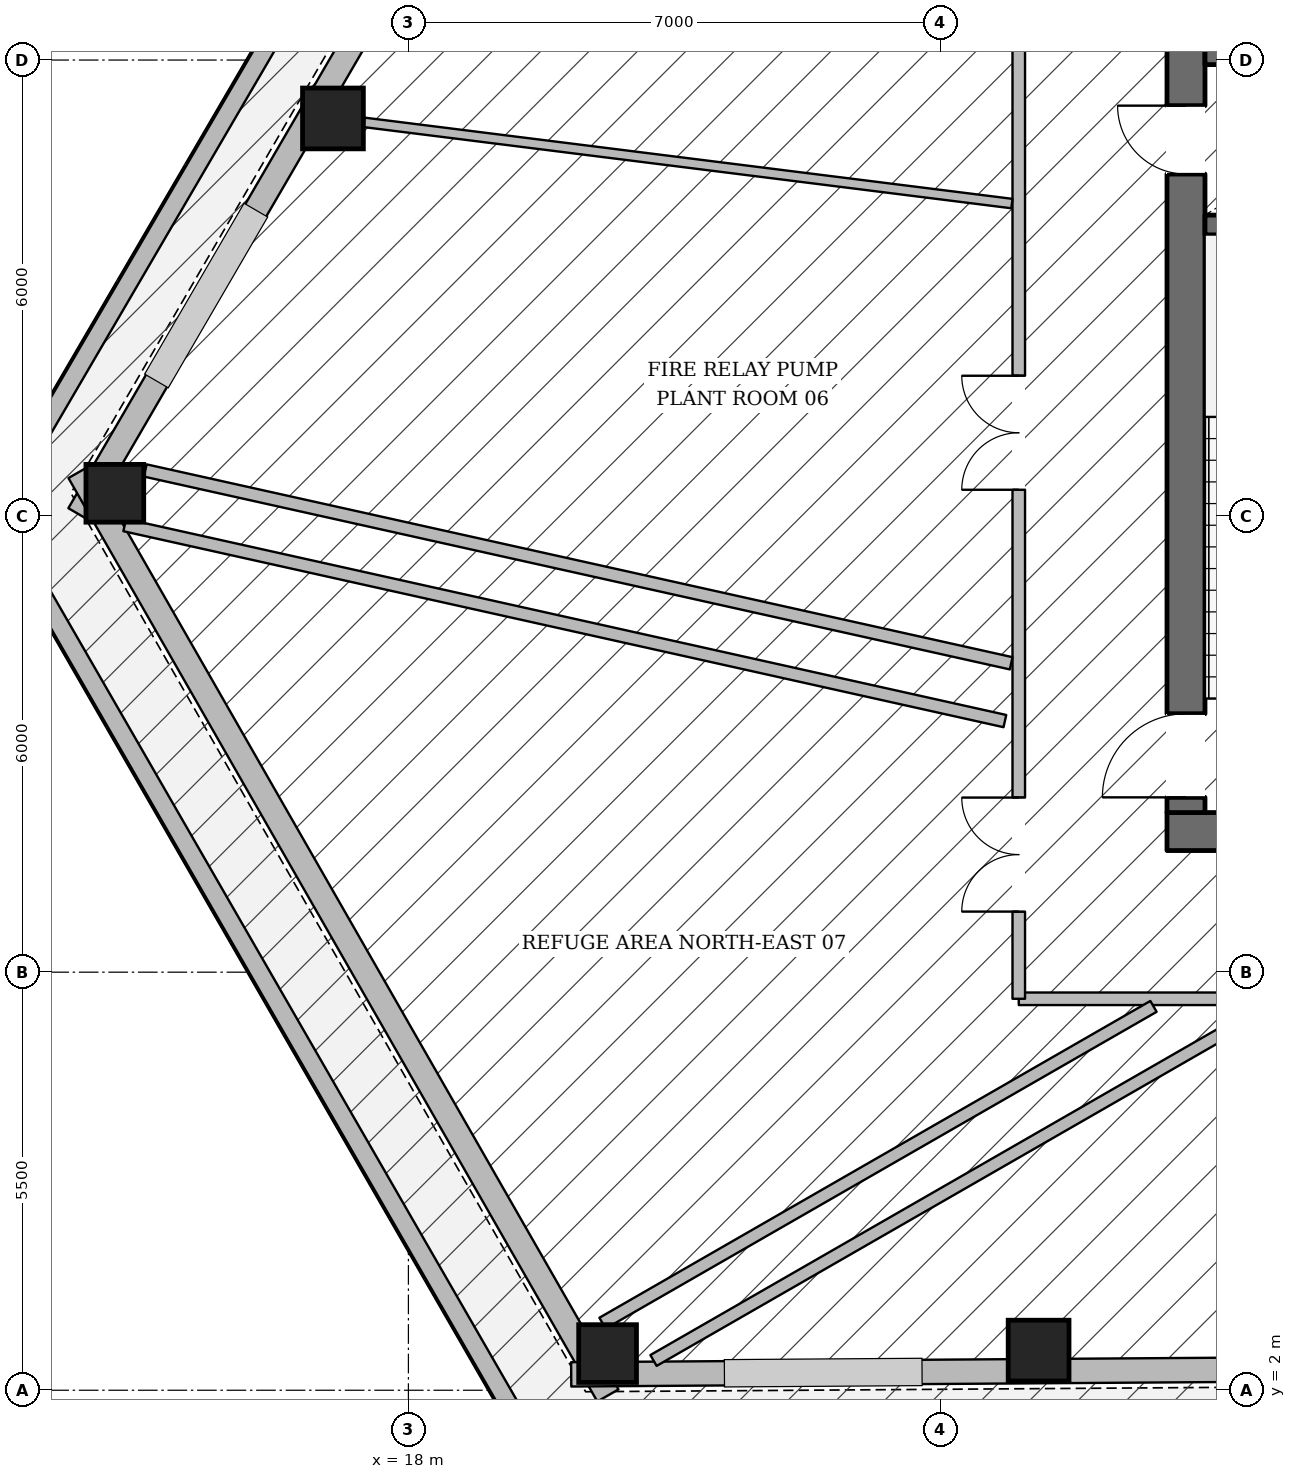
"""IFC4 building model, lengths in metres.
Left out: names, types, materials, properties, quantities, classifications, styles, units other than length and angle.
Written with IfcOpenShell. Run it as: python <this file> out.ifc"""

import sys

from ifc_helpers import new_model, si_unit, direction, frame, frame_2d, origin, origin_2d, place, context, subcontext, project, spatial, rectangle, hollow_rectangle, extrude, element, fill, save


model = new_model("IFC4")
c1 = context("Model", 3, precision=1e-05, world=origin(), true_north=direction((0.0, 1.0)))
c2 = subcontext(c1, "Body", "Model", "MODEL_VIEW")
j1 = project(units=[si_unit("LENGTHUNIT", "METRE"), si_unit("PLANEANGLEUNIT", "RADIAN")], contexts=[c1])
p1 = place(None, origin())
s1 = spatial("IfcSite", under=j1, at=p1, CompositionType="ELEMENT")
p2 = place(p1, origin())
s2 = spatial("IfcBuilding", under=s1, at=p2, CompositionType="ELEMENT")
p3 = place(p2, frame((0.0, 0.0, 75.3)))
s3 = spatial("IfcBuildingStorey", under=s2, at=p3, CompositionType="ELEMENT", Elevation=75.3)
p4 = place(p3, frame((27.98, 9.35, 0.0), z_axis=(0.0, 0.0, 1.0), x_axis=(1.0, 0.0, 0.0)))
e1 = element("IfcWall", 1, at=p4, inside=s3, PredefinedType="SOLIDWALL", context=c2, shape_type="SweptSolid", body=[
    extrude(rectangle(XDim=20.04, YDim=0.5, at=frame_2d((10.02, 0.0))), origin(), (0.0, 0.0, 1.0), 4.985),
])
p5 = place(p4, frame((10.52, 0.0, 0.0)))
e2 = element("IfcOpeningElement", 2, at=p5, cuts=e1, PredefinedType="OPENING", context=c2, shape_type="SweptSolid", body=[
    extrude(rectangle(XDim=1.4, YDim=2.2, at=frame_2d((0.7, 1.1))), frame((0.0, 0.26, 0.0), z_axis=(0.0, -1.0, 0.0), x_axis=(1.0, 0.0, 0.0)), (0.0, 0.0, 1.0), 0.52),
])
p6 = place(p3, frame((28.23, 9.6, 0.0), z_axis=(0.0, 0.0, 1.0), x_axis=(0.0, 1.0, 0.0)))
e3 = element("IfcWall", 3, at=p6, inside=s3, PredefinedType="SOLIDWALL", context=c2, shape_type="SweptSolid", body=[
    extrude(rectangle(XDim=13.0, YDim=0.5, at=frame_2d((6.5, 0.0))), origin(), (0.0, 0.0, 1.0), 4.985),
])
p7 = place(p6, frame((0.2, 0.0, 0.0)))
e4 = element("IfcOpeningElement", 4, at=p7, cuts=e3, PredefinedType="OPENING", context=c2, shape_type="SweptSolid", body=[
    extrude(rectangle(XDim=1.1, YDim=2.15, at=frame_2d((0.55, 1.075))), frame((0.0, 0.26, 0.0), z_axis=(0.0, -1.0, 0.0), x_axis=(1.0, 0.0, 0.0)), (0.0, 0.0, 1.0), 0.52),
])
p8 = place(p6, frame((8.4, 0.0, 0.0)))
e5 = element("IfcOpeningElement", 5, at=p8, cuts=e3, PredefinedType="OPENING", context=c2, shape_type="SweptSolid", body=[
    extrude(rectangle(XDim=0.9, YDim=2.1, at=frame_2d((0.45, 1.05))), frame((0.0, 0.26, 0.0), z_axis=(0.0, -1.0, 0.0), x_axis=(1.0, 0.0, 0.0)), (0.0, 0.0, 1.0), 0.52),
])
for number, where, z_axis, x_axis in (
    (6, (28.48, 17.33, 0.0), (0.0, 0.0, 1.0), (1.0, 0.0, 0.0)),
    (7, (28.48, 19.57, 0.0), (0.0, 0.0, 1.0), (1.0, 0.0, 0.0)),
):
    element("IfcWall", number, at=place(p3, frame(where, z_axis=z_axis, x_axis=x_axis)), inside=s3, PredefinedType="SHEAR", context=c2, shape_type="SweptSolid", body=[
        extrude(rectangle(XDim=3.2, YDim=0.26, at=frame_2d((1.6, 0.0))), origin(), (0.0, 0.0, 1.0), 4.985),
    ])
p9 = place(p3, frame((17.007, 18.732, 0.0), z_axis=(0.0, 0.0, 1.0), x_axis=(1.0, 0.0, 0.0)))
e8 = element("IfcColumn", 8, at=p9, inside=s3, PredefinedType="COLUMN", context=c2, shape_type="SweptSolid", body=[
    extrude(hollow_rectangle(XDim=0.8, YDim=0.8, WallThickness=0.036, at=origin_2d()), origin(), (0.0, 0.0, 1.0), 4.985),
])
for number, where, z_axis, x_axis in (
    (9, (14.138, 13.8, 0.0), (0.0, 0.0, 1.0), (1.0, 0.0, 0.0)),
    (10, (20.62, 2.482, 0.0), (0.0, 0.0, 1.0), (1.0, 0.0, 0.0)),
):
    element("IfcColumn", number, at=place(p3, frame(where, z_axis=z_axis, x_axis=x_axis)), inside=s3, PredefinedType="COLUMN", context=c2, shape_type="SweptSolid", body=[
        extrude(hollow_rectangle(XDim=0.76, YDim=0.76, WallThickness=0.035, at=origin_2d()), origin(), (0.0, 0.0, 1.0), 4.985),
    ])
p10 = place(p3, frame((26.291, 2.521, 0.0), z_axis=(0.0, 0.0, 1.0), x_axis=(1.0, 0.0, 0.0)))
e11 = element("IfcColumn", 11, at=p10, inside=s3, PredefinedType="COLUMN", context=c2, shape_type="SweptSolid", body=[
    extrude(hollow_rectangle(XDim=0.8, YDim=0.8, WallThickness=0.036, at=origin_2d()), origin(), (0.0, 0.0, 1.0), 4.985),
])
p11 = place(p3, frame((13.665, 13.524, 0.0), z_axis=(0.0, 0.0, 1.0), x_axis=(0.50295003743, 0.864315486295, 0.0)))
e12 = element("IfcWall", 12, at=p11, inside=s3, PredefinedType="STANDARD", context=c2, shape_type="SweptSolid", body=[
    extrude(rectangle(XDim=35.184, YDim=0.32, at=frame_2d((17.592, 0.0))), origin(), (0.0, 0.0, 1.0), 3.677),
])
p12 = place(p3, frame((20.625, 1.931, 0.0), z_axis=(0.0, 0.0, 1.0), x_axis=(-0.497008188636, 0.867745850136, 0.0)))
e13 = element("IfcWall", 13, at=p12, inside=s3, PredefinedType="STANDARD", context=c2, shape_type="SweptSolid", body=[
    extrude(rectangle(XDim=14.0, YDim=0.32, at=frame_2d((7.0, 0.0))), origin(), (0.0, 0.0, 1.0), 3.677),
])
p13 = place(p3, frame((55.119, 2.449, 0.0), z_axis=(0.0, 0.0, 1.0), x_axis=(-0.999976414427, -0.00686808493, 0.0)))
e14 = element("IfcWall", 14, at=p13, inside=s3, PredefinedType="STANDARD", context=c2, shape_type="SweptSolid", body=[
    extrude(rectangle(XDim=34.978, YDim=0.32, at=frame_2d((17.489, 0.0))), origin(), (0.0, 0.0, 1.0), 3.677),
])
p14 = place(p3, frame((30.821, 44.822, 0.0), z_axis=(0.0, 0.0, 1.0), x_axis=(-0.504421897802, -0.863457323218, 0.0)))
e15 = element("IfcWall", 15, at=p14, inside=s3, PredefinedType="PARAPET", context=c2, shape_type="SweptSolid", body=[
    extrude(rectangle(XDim=36.395, YDim=0.24, at=frame_2d((18.197, 0.0))), origin(), (0.0, 0.0, 1.0), 1.25),
])
p15 = place(p3, frame((12.464, 13.71, 0.0), z_axis=(0.0, 0.0, 1.0), x_axis=(0.499266541077, -0.86644845257, 0.0)))
e16 = element("IfcWall", 16, at=p15, inside=s3, PredefinedType="PARAPET", context=c2, shape_type="SweptSolid", body=[
    extrude(rectangle(XDim=14.621, YDim=0.24, at=frame_2d((7.31, 0.0))), origin(), (0.0, 0.0, 1.0), 1.25),
])
p16 = place(p3, frame((26.03, 7.15, 0.0), z_axis=(0.0, 0.0, 1.0), x_axis=(1.0, 0.0, 0.0)))
e17 = element("IfcWall", 17, at=p16, inside=s3, PredefinedType="PARTITIONING", context=c2, shape_type="SweptSolid", body=[
    extrude(rectangle(XDim=23.94, YDim=0.165, at=frame_2d((11.97, 0.0))), origin(), (0.0, 0.0, 1.0), 2.825),
])
p17 = place(p16, frame((8.652, 0.0, 0.0)))
e18 = element("IfcOpeningElement", 18, at=p17, cuts=e17, PredefinedType="OPENING", context=c2, shape_type="SweptSolid", body=[
    extrude(rectangle(XDim=1.5, YDim=2.25, at=frame_2d((0.75, 1.125))), frame((0.0, 0.093, 0.0), z_axis=(0.0, -1.0, 0.0), x_axis=(1.0, 0.0, 0.0)), (0.0, 0.0, 1.0), 0.185),
])
p18 = place(p16, frame((17.295, 0.0, 0.0)))
e19 = element("IfcOpeningElement", 19, at=p18, cuts=e17, PredefinedType="OPENING", context=c2, shape_type="SweptSolid", body=[
    extrude(rectangle(XDim=1.5, YDim=2.25, at=frame_2d((0.75, 1.125))), frame((0.0, 0.093, 0.0), z_axis=(0.0, -1.0, 0.0), x_axis=(1.0, 0.0, 0.0)), (0.0, 0.0, 1.0), 0.185),
])
p19 = place(p3, frame((26.03, 7.15, 0.0), z_axis=(0.0, 0.0, 1.0), x_axis=(0.0, 1.0, 0.0)))
e20 = element("IfcWall", 20, at=p19, inside=s3, PredefinedType="PARTITIONING", context=c2, shape_type="SweptSolid", body=[
    extrude(rectangle(XDim=17.9, YDim=0.165, at=frame_2d((8.95, 0.0))), origin(), (0.0, 0.0, 1.0), 4.985),
])
p20 = place(p19, frame((13.347, 0.0, 0.0)))
e21 = element("IfcOpeningElement", 21, at=p20, cuts=e20, PredefinedType="OPENING", context=c2, shape_type="SweptSolid", body=[
    extrude(rectangle(XDim=1.5, YDim=2.25, at=frame_2d((0.75, 1.125))), frame((0.0, 0.093, 0.0), z_axis=(0.0, -1.0, 0.0), x_axis=(1.0, 0.0, 0.0)), (0.0, 0.0, 1.0), 0.185),
])
p21 = place(p19, frame((6.697, 0.0, 0.0)))
e22 = element("IfcOpeningElement", 22, at=p21, cuts=e20, PredefinedType="OPENING", context=c2, shape_type="SweptSolid", body=[
    extrude(rectangle(XDim=1.5, YDim=2.25, at=frame_2d((0.75, 1.125))), frame((0.0, 0.093, 0.0), z_axis=(0.0, -1.0, 0.0), x_axis=(1.0, 0.0, 0.0)), (0.0, 0.0, 1.0), 0.185),
])
p22 = place(p19, frame((1.147, 0.0, 0.0)))
e23 = element("IfcOpeningElement", 23, at=p22, cuts=e20, PredefinedType="OPENING", context=c2, shape_type="SweptSolid", body=[
    extrude(rectangle(XDim=1.5, YDim=2.25, at=frame_2d((0.75, 1.125))), frame((0.0, 0.093, 0.0), z_axis=(0.0, -1.0, 0.0), x_axis=(1.0, 0.0, 0.0)), (0.0, 0.0, 1.0), 0.185),
])
p23 = place(p3, frame((25.847, 10.803, 0.0), z_axis=(0.0, 0.0, 1.0), x_axis=(-0.976091088051, 0.217361882184, 0.0)))
e24 = element("IfcWall", 24, at=p23, inside=s3, PredefinedType="PARTITIONING", context=c2, shape_type="SweptSolid", body=[
    extrude(rectangle(XDim=11.863, YDim=0.165, at=frame_2d((5.932, 0.0))), origin(), (0.0, 0.0, 1.0), 4.673),
])
p24 = place(p3, frame((25.93, 11.564, 0.0), z_axis=(0.0, 0.0, 1.0), x_axis=(-0.976090986432, 0.21736233852, 0.0)))
e25 = element("IfcWall", 25, at=p24, inside=s3, PredefinedType="PARTITIONING", context=c2, shape_type="SweptSolid", body=[
    extrude(rectangle(XDim=11.671, YDim=0.165, at=frame_2d((5.835, 0.0))), origin(), (0.0, 0.0, 1.0), 4.985),
])
p25 = place(p3, frame((28.754, 6.721, 0.0), z_axis=(0.0, 0.0, 1.0), x_axis=(-0.866925433787, -0.498437851947, 0.0)))
e26 = element("IfcWall", 26, at=p25, inside=s3, PredefinedType="PARTITIONING", context=c2, shape_type="SweptSolid", body=[
    extrude(rectangle(XDim=8.685, YDim=0.165, at=frame_2d((4.343, 0.0))), origin(), (0.0, 0.0, 1.0), 3.68),
])
p26 = place(p3, frame((27.802, 7.05, 0.0), z_axis=(0.0, 0.0, 1.0), x_axis=(-0.866923020548, -0.498442049233, 0.0)))
e27 = element("IfcWall", 27, at=p26, inside=s3, PredefinedType="PARTITIONING", context=c2, shape_type="SweptSolid", body=[
    extrude(rectangle(XDim=8.362, YDim=0.165, at=frame_2d((4.181, 0.0))), origin(), (0.0, 0.0, 1.0), 4.985),
])
p27 = place(p3, frame((25.939, 17.612, 0.0), z_axis=(0.0, 0.0, 1.0), x_axis=(-0.992233655776, 0.124387991159, 0.0)))
e28 = element("IfcWall", 28, at=p27, inside=s3, PredefinedType="PARTITIONING", context=c2, shape_type="SweptSolid", body=[
    extrude(rectangle(XDim=8.591, YDim=0.125, at=frame_2d((4.295, 0.0))), origin(), (0.0, 0.0, 1.0), 3.68),
])
p28 = place(p7, origin())
e29 = element("IfcDoor", 29, at=p28, inside=s3, OperationType="SINGLE_SWING_LEFT", PredefinedType="DOOR", context=c2, shape_type="SweptSolid", body=[
    extrude(rectangle(XDim=1.1, YDim=2.15, at=frame_2d((0.55, 1.075))), frame((0.0, 0.025, 0.0), z_axis=(0.0, -1.0, 0.0), x_axis=(1.0, 0.0, 0.0)), (0.0, 0.0, 1.0), 0.05),
])
fill(e4, e29)
p29 = place(p8, origin())
e30 = element("IfcDoor", 30, at=p29, inside=s3, OperationType="SINGLE_SWING_RIGHT", PredefinedType="DOOR", context=c2, shape_type="SweptSolid", body=[
    extrude(rectangle(XDim=0.9, YDim=2.1, at=frame_2d((0.45, 1.05))), frame((0.0, 0.025, 0.0), z_axis=(0.0, -1.0, 0.0), x_axis=(1.0, 0.0, 0.0)), (0.0, 0.0, 1.0), 0.05),
])
fill(e5, e30)
p30 = place(p21, origin())
e31 = element("IfcDoor", 31, at=p30, inside=s3, OperationType="DOUBLE_DOOR_SINGLE_SWING", PredefinedType="DOOR", context=c2, shape_type="SweptSolid", body=[
    extrude(rectangle(XDim=1.5, YDim=2.25, at=frame_2d((0.75, 1.125))), frame((0.0, 0.025, 0.0), z_axis=(0.0, -1.0, 0.0), x_axis=(1.0, 0.0, 0.0)), (0.0, 0.0, 1.0), 0.05),
])
fill(e22, e31)
p31 = place(p22, origin())
e32 = element("IfcDoor", 32, at=p31, inside=s3, OperationType="DOUBLE_DOOR_SINGLE_SWING", PredefinedType="DOOR", context=c2, shape_type="SweptSolid", body=[
    extrude(rectangle(XDim=1.5, YDim=2.25, at=frame_2d((0.75, 1.125))), frame((0.0, 0.025, 0.0), z_axis=(0.0, -1.0, 0.0), x_axis=(1.0, 0.0, 0.0)), (0.0, 0.0, 1.0), 0.05),
])
fill(e23, e32)
save(model, sys.argv[1])
